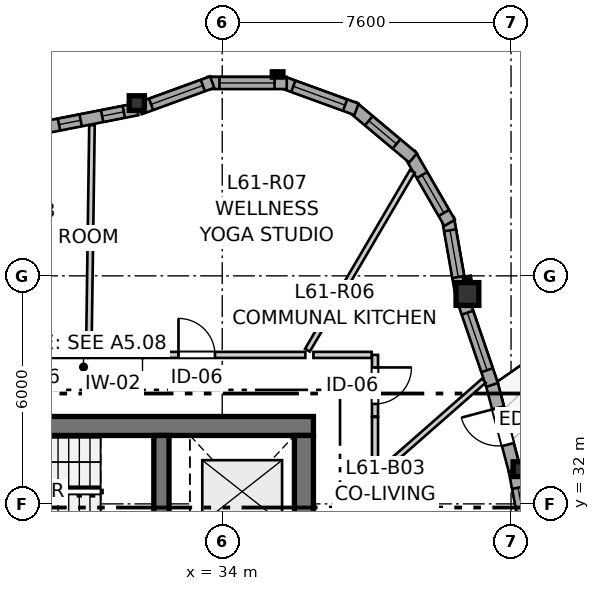
"""IFC4 building model, lengths in metres.
Left out: names, types, materials, properties, quantities, classifications, styles, units other than length and angle.
Written with IfcOpenShell. Run it as: python <this file> out.ifc"""

import sys

from ifc_helpers import new_model, si_unit, direction, frame, frame_2d, origin, origin_2d, place, context, subcontext, project, spatial, rectangle, i_section, extrude, source, transform, mapped, element, fill, save


model = new_model("IFC4")
c1 = context("Model", 3, precision=1e-05, world=origin(), true_north=direction((0.0, 1.0)))
c2 = subcontext(c1, "Body", "Model", "MODEL_VIEW")
j1 = project(units=[si_unit("LENGTHUNIT", "METRE"), si_unit("PLANEANGLEUNIT", "RADIAN")], contexts=[c1])
p1 = place(None, origin())
s1 = spatial("IfcSite", under=j1, at=p1, CompositionType="ELEMENT")
p2 = place(p1, origin())
s2 = spatial("IfcBuilding", under=s1, at=p2, CompositionType="ELEMENT")
p3 = place(p2, frame((0.0, 0.0, 205.2)))
s3 = spatial("IfcBuildingStorey", under=s2, at=p3, CompositionType="ELEMENT", Elevation=205.2)
p4 = place(p3, frame((36.4, 34.05, 0.0), z_axis=(0.0, 0.0, 1.0), x_axis=(-1.0, 0.0, 0.0)))
e1 = element("IfcWall", 1, at=p4, inside=s3, PredefinedType="SHEAR", context=c2, shape_type="SweptSolid", body=[
    extrude(rectangle(XDim=12.1, YDim=0.5, at=frame_2d((6.05, 0.0))), origin(), (0.0, 0.0, 1.0), 2.935),
])
p5 = place(p3, frame((36.15, 18.2, 0.0), z_axis=(0.0, 0.0, 1.0), x_axis=(0.0, 1.0, 0.0)))
e2 = element("IfcWall", 2, at=p5, inside=s3, PredefinedType="SHEAR", context=c2, shape_type="SweptSolid", body=[
    extrude(rectangle(XDim=15.6, YDim=0.5, at=frame_2d((7.8, 0.0))), origin(), (0.0, 0.0, 1.0), 2.935),
])
p6 = place(p5, frame((4.25, 0.0, 0.0)))
e3 = element("IfcOpeningElement", 3, at=p6, cuts=e2, PredefinedType="OPENING", context=c2, shape_type="SweptSolid", body=[
    extrude(rectangle(XDim=1.1, YDim=2.15, at=frame_2d((0.55, 1.075))), frame((0.0, 0.26, 0.0), z_axis=(0.0, -1.0, 0.0), x_axis=(1.0, 0.0, 0.0)), (0.0, 0.0, 1.0), 0.52),
])
p7 = place(p5, frame((10.25, 0.0, 0.0)))
e4 = element("IfcOpeningElement", 4, at=p7, cuts=e2, PredefinedType="OPENING", context=c2, shape_type="SweptSolid", body=[
    extrude(rectangle(XDim=1.1, YDim=2.15, at=frame_2d((0.55, 1.075))), frame((0.0, 0.26, 0.0), z_axis=(0.0, -1.0, 0.0), x_axis=(1.0, 0.0, 0.0)), (0.0, 0.0, 1.0), 0.52),
])
p8 = place(p3, frame((32.4, 30.85, 0.0), z_axis=(0.0, 0.0, 1.0), x_axis=(0.0, 1.0, 0.0)))
e5 = element("IfcWall", 5, at=p8, inside=s3, PredefinedType="SHEAR", context=c2, shape_type="SweptSolid", body=[
    extrude(rectangle(XDim=2.95, YDim=0.4, at=frame_2d((1.475, 0.0))), origin(), (0.0, 0.0, 1.0), 2.935),
])
m1 = source(origin(), c2, "Body", "SweptSolid", [
    extrude(i_section(OverallWidth=0.398, OverallDepth=0.387, WebThickness=0.019, FlangeThickness=0.03, FilletRadius=0.015, at=origin_2d()), origin(), (0.0, 0.0, 1.0), 2.935),
])
p9 = place(p3, frame((41.854, 32.914, 0.0), z_axis=(0.0, 0.0, 1.0), x_axis=(1.0, 0.0, 0.0)))
e6 = element("IfcColumn", 6, at=p9, inside=s3, PredefinedType="PILASTER", context=c2, shape_type="MappedRepresentation", body=[
    mapped(m1, transform((0.0, 0.0, 0.0), x_axis=(1.0, 0.0, 0.0), y_axis=(0.0, 1.0, 0.0), z_axis=(0.0, 0.0, 1.0), scale=1.0)),
])
m2 = source(origin(), c2, "Body", "SweptSolid", [
    extrude(rectangle(XDim=0.6, YDim=0.6, at=origin_2d()), origin(), (0.0, 0.0, 1.0), 2.935),
])
p10 = place(p3, frame((40.452, 37.522, 0.0), z_axis=(0.0, 0.0, 1.0), x_axis=(1.0, 0.0, 0.0)))
e7 = element("IfcColumn", 7, at=p10, inside=s3, PredefinedType="COLUMN", context=c2, shape_type="MappedRepresentation", body=[
    mapped(m2, transform((0.0, 0.0, 0.0), x_axis=(1.0, 0.0, 0.0), y_axis=(0.0, 1.0, 0.0), z_axis=(0.0, 0.0, 1.0), scale=1.0)),
])
p11 = place(p3, frame((31.752, 42.545, 0.0), z_axis=(0.0, 0.0, 1.0), x_axis=(1.0, 0.0, 0.0)))
e8 = element("IfcColumn", 8, at=p11, inside=s3, PredefinedType="PILASTER", context=c2, shape_type="MappedRepresentation", body=[
    mapped(m1, transform((0.0, 0.0, 0.0), x_axis=(1.0, 0.0, 0.0), y_axis=(0.0, 1.0, 0.0), z_axis=(0.0, 0.0, 1.0), scale=1.0)),
])
p12 = place(p3, frame((42.141, 30.542, 0.0), z_axis=(0.0, 0.0, 1.0), x_axis=(-0.186632734065, 0.982429754525, 0.0)))
e9 = element("IfcWall", 9, at=p12, inside=s3, PredefinedType="SOLIDWALL", context=c2, shape_type="SweptSolid", body=[
    extrude(rectangle(XDim=2.364, YDim=0.32, at=frame_2d((1.182, 0.0))), origin(), (0.0, 0.0, 1.0), 2.555),
])
p13 = place(p12, frame((0.467, 0.0, 0.82)))
e10 = element("IfcOpeningElement", 10, at=p13, cuts=e9, PredefinedType="OPENING", context=c2, shape_type="SweptSolid", body=[
    extrude(rectangle(XDim=1.45, YDim=1.25, at=frame_2d((0.725, 0.625))), frame((0.0, 0.17, 0.0), z_axis=(0.0, -1.0, 0.0), x_axis=(1.0, 0.0, 0.0)), (0.0, 0.0, 1.0), 0.34),
])
p14 = place(p3, frame((41.694, 32.892, 0.0), z_axis=(0.0, 0.0, 1.0), x_axis=(-0.257068132003, 0.966393282007, 0.0)))
e11 = element("IfcWall", 11, at=p14, inside=s3, PredefinedType="SOLIDWALL", context=c2, shape_type="SweptSolid", body=[
    extrude(rectangle(XDim=2.403, YDim=0.32, at=frame_2d((1.201, 0.0))), origin(), (0.0, 0.0, 1.0), 2.555),
])
p15 = place(p14, frame((0.691, 0.0, 0.0)))
e12 = element("IfcOpeningElement", 12, at=p15, cuts=e11, PredefinedType="OPENING", context=c2, shape_type="SweptSolid", body=[
    extrude(rectangle(XDim=1.0, YDim=2.1, at=frame_2d((0.5, 1.05))), frame((0.0, 0.17, 0.0), z_axis=(0.0, -1.0, 0.0), x_axis=(1.0, 0.0, 0.0)), (0.0, 0.0, 1.0), 0.34),
])
p16 = place(p3, frame((41.102, 35.13, 0.0), z_axis=(0.0, 0.0, 1.0), x_axis=(-0.323685265908, 0.946164810503, 0.0)))
e13 = element("IfcWall", 13, at=p16, inside=s3, PredefinedType="SOLIDWALL", context=c2, shape_type="SweptSolid", body=[
    extrude(rectangle(XDim=2.384, YDim=0.32, at=frame_2d((1.192, 0.0))), origin(), (0.0, 0.0, 1.0), 2.555),
])
p17 = place(p16, frame((0.408, 0.0, 0.82)))
e14 = element("IfcOpeningElement", 14, at=p17, cuts=e13, PredefinedType="OPENING", context=c2, shape_type="SweptSolid", body=[
    extrude(rectangle(XDim=1.6, YDim=1.35, at=frame_2d((0.8, 0.675))), frame((0.0, 0.17, 0.0), z_axis=(0.0, -1.0, 0.0), x_axis=(1.0, 0.0, 0.0)), (0.0, 0.0, 1.0), 0.34),
])
p18 = place(p3, frame((40.279, 37.583, 0.0), z_axis=(0.0, 0.0, 1.0), x_axis=(-0.173671780312, 0.984803590937, 0.0)))
e15 = element("IfcWall", 15, at=p18, inside=s3, PredefinedType="SOLIDWALL", context=c2, shape_type="SweptSolid", body=[
    extrude(rectangle(XDim=1.962, YDim=0.32, at=frame_2d((0.981, 0.0))), origin(), (0.0, 0.0, 1.0), 2.555),
])
p19 = place(p18, frame((0.391, 0.0, 0.82)))
e16 = element("IfcOpeningElement", 16, at=p19, cuts=e15, PredefinedType="OPENING", context=c2, shape_type="SweptSolid", body=[
    extrude(rectangle(XDim=1.25, YDim=1.35, at=frame_2d((0.625, 0.675))), frame((0.0, 0.17, 0.0), z_axis=(0.0, -1.0, 0.0), x_axis=(1.0, 0.0, 0.0)), (0.0, 0.0, 1.0), 0.34),
])
p20 = place(p3, frame((39.983, 39.393, 0.0), z_axis=(0.0, 0.0, 1.0), x_axis=(-0.499995423472, 0.866028046028, 0.0)))
e17 = element("IfcWall", 17, at=p20, inside=s3, PredefinedType="SOLIDWALL", context=c2, shape_type="SweptSolid", body=[
    extrude(rectangle(XDim=2.09, YDim=0.32, at=frame_2d((1.045, 0.0))), origin(), (0.0, 0.0, 1.0), 2.555),
])
p21 = place(p20, frame((0.303, 0.0, 0.82)))
e18 = element("IfcOpeningElement", 18, at=p21, cuts=e17, PredefinedType="OPENING", context=c2, shape_type="SweptSolid", body=[
    extrude(rectangle(XDim=1.15, YDim=1.2, at=frame_2d((0.575, 0.6))), frame((0.0, 0.17, 0.0), z_axis=(0.0, -1.0, 0.0), x_axis=(1.0, 0.0, 0.0)), (0.0, 0.0, 1.0), 0.34),
])
p22 = place(p3, frame((39.022, 41.104, 0.0), z_axis=(0.0, 0.0, 1.0), x_axis=(-0.766072824549, 0.642753784499, 0.0)))
e19 = element("IfcWall", 19, at=p22, inside=s3, PredefinedType="SOLIDWALL", context=c2, shape_type="SweptSolid", body=[
    extrude(rectangle(XDim=2.091, YDim=0.32, at=frame_2d((1.045, 0.0))), origin(), (0.0, 0.0, 1.0), 2.555),
])
p23 = place(p22, frame((0.57, 0.0, 0.82)))
e20 = element("IfcOpeningElement", 20, at=p23, cuts=e19, PredefinedType="OPENING", context=c2, shape_type="SweptSolid", body=[
    extrude(rectangle(XDim=0.95, YDim=1.35, at=frame_2d((0.475, 0.675))), frame((0.0, 0.17, 0.0), z_axis=(0.0, -1.0, 0.0), x_axis=(1.0, 0.0, 0.0)), (0.0, 0.0, 1.0), 0.34),
])
p24 = place(p3, frame((37.533, 42.382, 0.0), z_axis=(0.0, 0.0, 1.0), x_axis=(-0.939697896412, 0.342005648315, 0.0)))
e21 = element("IfcWall", 21, at=p24, inside=s3, PredefinedType="SOLIDWALL", context=c2, shape_type="SweptSolid", body=[
    extrude(rectangle(XDim=2.09, YDim=0.32, at=frame_2d((1.045, 0.0))), origin(), (0.0, 0.0, 1.0), 2.555),
])
p25 = place(p24, frame((0.32, 0.0, 0.82)))
e22 = element("IfcOpeningElement", 22, at=p25, cuts=e21, PredefinedType="OPENING", context=c2, shape_type="SweptSolid", body=[
    extrude(rectangle(XDim=1.45, YDim=1.25, at=frame_2d((0.725, 0.625))), frame((0.0, 0.17, 0.0), z_axis=(0.0, -1.0, 0.0), x_axis=(1.0, 0.0, 0.0)), (0.0, 0.0, 1.0), 0.34),
])
p26 = place(p3, frame((35.698, 43.074, 0.0), z_axis=(0.0, 0.0, 1.0), x_axis=(-1.0, 0.0, 0.0)))
e23 = element("IfcWall", 23, at=p26, inside=s3, PredefinedType="SOLIDWALL", context=c2, shape_type="SweptSolid", body=[
    extrude(rectangle(XDim=2.09, YDim=0.32, at=frame_2d((1.045, 0.0))), origin(), (0.0, 0.0, 1.0), 2.555),
])
p27 = place(p26, frame((0.32, 0.0, 0.82)))
e24 = element("IfcOpeningElement", 24, at=p27, cuts=e23, PredefinedType="OPENING", context=c2, shape_type="SweptSolid", body=[
    extrude(rectangle(XDim=1.45, YDim=1.25, at=frame_2d((0.725, 0.625))), frame((0.0, 0.17, 0.0), z_axis=(0.0, -1.0, 0.0), x_axis=(1.0, 0.0, 0.0)), (0.0, 0.0, 1.0), 0.34),
])
p28 = place(p3, frame((33.736, 43.097, 0.0), z_axis=(0.0, 0.0, 1.0), x_axis=(-0.939691662178, -0.342022777067, 0.0)))
e25 = element("IfcWall", 25, at=p28, inside=s3, PredefinedType="SOLIDWALL", context=c2, shape_type="SweptSolid", body=[
    extrude(rectangle(XDim=2.032, YDim=0.32, at=frame_2d((1.016, 0.0))), origin(), (0.0, 0.0, 1.0), 2.555),
])
p29 = place(p28, frame((0.261, 0.0, 0.82)))
e26 = element("IfcOpeningElement", 26, at=p29, cuts=e25, PredefinedType="OPENING", context=c2, shape_type="SweptSolid", body=[
    extrude(rectangle(XDim=1.45, YDim=1.25, at=frame_2d((0.725, 0.625))), frame((0.0, 0.17, 0.0), z_axis=(0.0, -1.0, 0.0), x_axis=(1.0, 0.0, 0.0)), (0.0, 0.0, 1.0), 0.34),
])
p30 = place(p3, frame((31.764, 42.385, 0.0), z_axis=(0.0, 0.0, 1.0), x_axis=(-0.981229659911, -0.192842823335, 0.0)))
e27 = element("IfcWall", 27, at=p30, inside=s3, PredefinedType="SOLIDWALL", context=c2, shape_type="SweptSolid", body=[
    extrude(rectangle(XDim=2.454, YDim=0.32, at=frame_2d((1.227, 0.0))), origin(), (0.0, 0.0, 1.0), 2.555),
])
p31 = place(p30, frame((0.361, 0.0, 0.82)))
e28 = element("IfcOpeningElement", 28, at=p31, cuts=e27, PredefinedType="OPENING", context=c2, shape_type="SweptSolid", body=[
    extrude(rectangle(XDim=0.58, YDim=1.35, at=frame_2d((0.29, 0.675))), frame((0.0, 0.17, 0.0), z_axis=(0.0, -1.0, 0.0), x_axis=(1.0, 0.0, 0.0)), (0.0, 0.0, 1.0), 0.34),
])
p32 = place(p30, frame((1.518, 0.0, 0.82)))
e29 = element("IfcOpeningElement", 29, at=p32, cuts=e27, PredefinedType="OPENING", context=c2, shape_type="SweptSolid", body=[
    extrude(rectangle(XDim=0.58, YDim=1.35, at=frame_2d((0.29, 0.675))), frame((0.0, 0.17, 0.0), z_axis=(0.0, -1.0, 0.0), x_axis=(1.0, 0.0, 0.0)), (0.0, 0.0, 1.0), 0.34),
])
p33 = place(p3, frame((30.474, 35.92, 0.0), z_axis=(0.0, 0.0, 1.0), x_axis=(1.0, 0.0, 0.0)))
e30 = element("IfcWall", 30, at=p33, inside=s3, PredefinedType="PARTITIONING", context=c2, shape_type="SweptSolid", body=[
    extrude(rectangle(XDim=5.713, YDim=0.16, at=frame_2d((2.856, 0.0))), origin(), (0.0, 0.0, 1.0), 2.935),
])
p34 = place(p33, frame((2.375, 0.0, 0.0)))
e31 = element("IfcOpeningElement", 31, at=p34, cuts=e30, PredefinedType="OPENING", context=c2, shape_type="SweptSolid", body=[
    extrude(rectangle(XDim=0.96, YDim=2.1, at=frame_2d((0.48, 1.05))), frame((0.0, 0.09, 0.0), z_axis=(0.0, -1.0, 0.0), x_axis=(1.0, 0.0, 0.0)), (0.0, 0.0, 1.0), 0.18),
])
p35 = place(p3, frame((38.02, 32.748, 0.0), z_axis=(0.0, 0.0, 1.0), x_axis=(0.0, -1.0, 0.0)))
e32 = element("IfcWall", 32, at=p35, inside=s3, PredefinedType="PARTITIONING", context=c2, shape_type="SweptSolid", body=[
    extrude(rectangle(XDim=4.71, YDim=0.16, at=frame_2d((2.355, 0.0))), origin(), (0.0, 0.0, 1.0), 2.603),
])
p36 = place(p35, frame((1.897, 0.0, 0.0)))
e33 = element("IfcOpeningElement", 33, at=p36, cuts=e32, PredefinedType="OPENING", context=c2, shape_type="SweptSolid", body=[
    extrude(rectangle(XDim=0.92, YDim=2.1, at=frame_2d((0.46, 1.05))), frame((0.0, 0.09, 0.0), z_axis=(0.0, -1.0, 0.0), x_axis=(1.0, 0.0, 0.0)), (0.0, 0.0, 1.0), 0.18),
])
p37 = place(p3, frame((27.598, 35.92, 0.0), z_axis=(0.0, 0.0, 1.0), x_axis=(1.0, 0.0, 0.0)))
e34 = element("IfcWall", 34, at=p37, inside=s3, PredefinedType="PARTITIONING", context=c2, shape_type="SweptSolid", body=[
    extrude(rectangle(XDim=2.861, YDim=0.16, at=frame_2d((1.431, 0.0))), origin(), (0.0, 0.0, 1.0), 2.935),
])
p38 = place(p37, frame((0.95, 0.0, 0.0)))
e35 = element("IfcOpeningElement", 35, at=p38, cuts=e34, PredefinedType="OPENING", context=c2, shape_type="SweptSolid", body=[
    extrude(rectangle(XDim=0.96, YDim=2.1, at=frame_2d((0.48, 1.05))), frame((0.0, 0.09, 0.0), z_axis=(0.0, -1.0, 0.0), x_axis=(1.0, 0.0, 0.0)), (0.0, 0.0, 1.0), 0.18),
])
p39 = place(p3, frame((38.02, 35.92, 0.0), z_axis=(0.0, 0.0, 1.0), x_axis=(0.0, -1.0, 0.0)))
e36 = element("IfcWall", 36, at=p39, inside=s3, PredefinedType="PARTITIONING", context=c2, shape_type="SweptSolid", body=[
    extrude(rectangle(XDim=1.62, YDim=0.16, at=frame_2d((0.81, 0.0))), origin(), (0.0, 0.0, 1.0), 2.603),
])
p40 = place(p39, frame((0.33, 0.0, 0.0)))
e37 = element("IfcOpeningElement", 37, at=p40, cuts=e36, PredefinedType="OPENING", context=c2, shape_type="SweptSolid", body=[
    extrude(rectangle(XDim=0.96, YDim=2.1, at=frame_2d((0.48, 1.05))), frame((0.0, 0.09, 0.0), z_axis=(0.0, -1.0, 0.0), x_axis=(1.0, 0.0, 0.0)), (0.0, 0.0, 1.0), 0.18),
])
p41 = place(p3, frame((30.489, 36.009, 0.0), z_axis=(0.0, 0.0, 1.0), x_axis=(0.013978627514, 0.999902294213, 0.0)))
e38 = element("IfcWall", 38, at=p41, inside=s3, PredefinedType="PARTITIONING", context=c2, shape_type="SweptSolid", body=[
    extrude(rectangle(XDim=5.956, YDim=0.145, at=frame_2d((2.978, 0.0))), origin(), (0.0, 0.0, 1.0), 2.935),
])
p42 = place(p3, frame((36.242, 36.044, 0.0), z_axis=(0.0, 0.0, 1.0), x_axis=(0.50599508157, 0.862536362959, 0.0)))
e39 = element("IfcWall", 39, at=p42, inside=s3, PredefinedType="PARTITIONING", context=c2, shape_type="SweptSolid", body=[
    extrude(rectangle(XDim=5.456, YDim=0.145, at=frame_2d((2.728, 0.0))), origin(), (0.0, 0.0, 1.0), 2.935),
])
p43 = place(p3, frame((38.154, 32.845, 0.0), z_axis=(0.0, 0.0, 1.0), x_axis=(0.751793032372, 0.659399148071, 0.0)))
e40 = element("IfcWall", 40, at=p43, inside=s3, PredefinedType="PARTITIONING", context=c2, shape_type="SweptSolid", body=[
    extrude(rectangle(XDim=3.631, YDim=0.145, at=frame_2d((1.815, 0.0))), origin(), (0.0, 0.0, 1.0), 2.935),
])
p44 = place(p3, frame((36.4, 35.92, 0.0), z_axis=(0.0, 0.0, 1.0), x_axis=(1.0, 0.0, 0.0)))
e41 = element("IfcWall", 41, at=p44, inside=s3, PredefinedType="PARTITIONING", context=c2, shape_type="SweptSolid", body=[
    extrude(rectangle(XDim=1.532, YDim=0.16, at=frame_2d((0.766, 0.0))), origin(), (0.0, 0.0, 1.0), 2.935),
])
p45 = place(p3, frame((38.02, 32.938, 0.0), z_axis=(0.0, 0.0, 1.0), x_axis=(0.0, 1.0, 0.0)))
e42 = element("IfcWall", 42, at=p45, inside=s3, PredefinedType="PARTITIONING", context=c2, shape_type="SweptSolid", body=[
    extrude(rectangle(XDim=1.347, YDim=0.16, at=frame_2d((0.674, 0.0))), origin(), (0.0, 0.0, 1.0), 2.603),
])
m3 = source(origin(), c2, "Body", "SweptSolid", [
    extrude(rectangle(XDim=1.45, YDim=1.25, at=frame_2d((0.725, 0.625))), frame((0.0, 0.03, 0.0), z_axis=(0.0, -1.0, 0.0), x_axis=(1.0, 0.0, 0.0)), (0.0, 0.0, 1.0), 0.06),
])
p46 = place(p13, origin())
e43 = element("IfcWindow", 43, at=p46, inside=s3, PartitioningType="SINGLE_PANEL", PredefinedType="WINDOW", context=c2, shape_type="MappedRepresentation", body=[
    mapped(m3, transform((0.0, 0.0, 0.0), x_axis=(1.0, 0.0, 0.0), y_axis=(0.0, 1.0, 0.0), z_axis=(0.0, 0.0, 1.0), scale=1.0)),
])
fill(e10, e43)
m4 = source(origin(), c2, "Body", "SweptSolid", [
    extrude(rectangle(XDim=1.0, YDim=2.1, at=frame_2d((0.5, 1.05))), frame((0.0, 0.025, 0.0), z_axis=(0.0, -1.0, 0.0), x_axis=(1.0, 0.0, 0.0)), (0.0, 0.0, 1.0), 0.05),
])
p47 = place(p15, origin())
e44 = element("IfcDoor", 44, at=p47, inside=s3, OperationType="SINGLE_SWING_RIGHT", PredefinedType="DOOR", context=c2, shape_type="MappedRepresentation", body=[
    mapped(m4, transform((0.0, 0.0, 0.0), x_axis=(1.0, 0.0, 0.0), y_axis=(0.0, 1.0, 0.0), z_axis=(0.0, 0.0, 1.0), scale=1.0)),
])
fill(e12, e44)
m5 = source(origin(), c2, "Body", "SweptSolid", [
    extrude(rectangle(XDim=1.6, YDim=1.35, at=frame_2d((0.8, 0.675))), frame((0.0, 0.03, 0.0), z_axis=(0.0, -1.0, 0.0), x_axis=(1.0, 0.0, 0.0)), (0.0, 0.0, 1.0), 0.06),
])
p48 = place(p17, origin())
e45 = element("IfcWindow", 45, at=p48, inside=s3, PartitioningType="SINGLE_PANEL", PredefinedType="WINDOW", context=c2, shape_type="MappedRepresentation", body=[
    mapped(m5, transform((0.0, 0.0, 0.0), x_axis=(1.0, 0.0, 0.0), y_axis=(0.0, 1.0, 0.0), z_axis=(0.0, 0.0, 1.0), scale=1.0)),
])
fill(e14, e45)
m6 = source(origin(), c2, "Body", "SweptSolid", [
    extrude(rectangle(XDim=1.25, YDim=1.35, at=frame_2d((0.625, 0.675))), frame((0.0, 0.03, 0.0), z_axis=(0.0, -1.0, 0.0), x_axis=(1.0, 0.0, 0.0)), (0.0, 0.0, 1.0), 0.06),
])
p49 = place(p19, origin())
e46 = element("IfcWindow", 46, at=p49, inside=s3, PartitioningType="SINGLE_PANEL", PredefinedType="WINDOW", context=c2, shape_type="MappedRepresentation", body=[
    mapped(m6, transform((0.0, 0.0, 0.0), x_axis=(1.0, 0.0, 0.0), y_axis=(0.0, 1.0, 0.0), z_axis=(0.0, 0.0, 1.0), scale=1.0)),
])
fill(e16, e46)
m7 = source(origin(), c2, "Body", "SweptSolid", [
    extrude(rectangle(XDim=1.15, YDim=1.2, at=frame_2d((0.575, 0.6))), frame((0.0, 0.03, 0.0), z_axis=(0.0, -1.0, 0.0), x_axis=(1.0, 0.0, 0.0)), (0.0, 0.0, 1.0), 0.06),
])
p50 = place(p21, origin())
e47 = element("IfcWindow", 47, at=p50, inside=s3, PartitioningType="SINGLE_PANEL", PredefinedType="WINDOW", context=c2, shape_type="MappedRepresentation", body=[
    mapped(m7, transform((0.0, 0.0, 0.0), x_axis=(1.0, 0.0, 0.0), y_axis=(0.0, 1.0, 0.0), z_axis=(0.0, 0.0, 1.0), scale=1.0)),
])
fill(e18, e47)
m8 = source(origin(), c2, "Body", "SweptSolid", [
    extrude(rectangle(XDim=0.95, YDim=1.35, at=frame_2d((0.475, 0.675))), frame((0.0, 0.03, 0.0), z_axis=(0.0, -1.0, 0.0), x_axis=(1.0, 0.0, 0.0)), (0.0, 0.0, 1.0), 0.06),
])
p51 = place(p23, origin())
e48 = element("IfcWindow", 48, at=p51, inside=s3, PartitioningType="SINGLE_PANEL", PredefinedType="WINDOW", context=c2, shape_type="MappedRepresentation", body=[
    mapped(m8, transform((0.0, 0.0, 0.0), x_axis=(1.0, 0.0, 0.0), y_axis=(0.0, 1.0, 0.0), z_axis=(0.0, 0.0, 1.0), scale=1.0)),
])
fill(e20, e48)
p52 = place(p25, origin())
e49 = element("IfcWindow", 49, at=p52, inside=s3, PartitioningType="SINGLE_PANEL", PredefinedType="WINDOW", context=c2, shape_type="MappedRepresentation", body=[
    mapped(m3, transform((0.0, 0.0, 0.0), x_axis=(1.0, 0.0, 0.0), y_axis=(0.0, 1.0, 0.0), z_axis=(0.0, 0.0, 1.0), scale=1.0)),
])
fill(e22, e49)
p53 = place(p27, origin())
e50 = element("IfcWindow", 50, at=p53, inside=s3, PartitioningType="SINGLE_PANEL", PredefinedType="WINDOW", context=c2, shape_type="MappedRepresentation", body=[
    mapped(m3, transform((0.0, 0.0, 0.0), x_axis=(1.0, 0.0, 0.0), y_axis=(0.0, 1.0, 0.0), z_axis=(0.0, 0.0, 1.0), scale=1.0)),
])
fill(e24, e50)
p54 = place(p29, origin())
e51 = element("IfcWindow", 51, at=p54, inside=s3, PartitioningType="SINGLE_PANEL", PredefinedType="WINDOW", context=c2, shape_type="MappedRepresentation", body=[
    mapped(m3, transform((0.0, 0.0, 0.0), x_axis=(1.0, 0.0, 0.0), y_axis=(0.0, 1.0, 0.0), z_axis=(0.0, 0.0, 1.0), scale=1.0)),
])
fill(e26, e51)
m9 = source(origin(), c2, "Body", "SweptSolid", [
    extrude(rectangle(XDim=0.58, YDim=1.35, at=frame_2d((0.29, 0.675))), frame((0.0, 0.03, 0.0), z_axis=(0.0, -1.0, 0.0), x_axis=(1.0, 0.0, 0.0)), (0.0, 0.0, 1.0), 0.06),
])
p55 = place(p31, origin())
e52 = element("IfcWindow", 52, at=p55, inside=s3, PartitioningType="SINGLE_PANEL", PredefinedType="WINDOW", context=c2, shape_type="MappedRepresentation", body=[
    mapped(m9, transform((0.0, 0.0, 0.0), x_axis=(1.0, 0.0, 0.0), y_axis=(0.0, 1.0, 0.0), z_axis=(0.0, 0.0, 1.0), scale=1.0)),
])
fill(e28, e52)
p56 = place(p32, origin())
e53 = element("IfcWindow", 53, at=p56, inside=s3, PartitioningType="SINGLE_PANEL", PredefinedType="WINDOW", context=c2, shape_type="MappedRepresentation", body=[
    mapped(m9, transform((0.0, 0.0, 0.0), x_axis=(1.0, 0.0, 0.0), y_axis=(0.0, 1.0, 0.0), z_axis=(0.0, 0.0, 1.0), scale=1.0)),
])
fill(e29, e53)
m10 = source(origin(), c2, "Body", "SweptSolid", [
    extrude(rectangle(XDim=0.96, YDim=2.1, at=frame_2d((0.48, 1.05))), frame((0.0, 0.025, 0.0), z_axis=(0.0, -1.0, 0.0), x_axis=(1.0, 0.0, 0.0)), (0.0, 0.0, 1.0), 0.05),
])
p57 = place(p34, origin())
e54 = element("IfcDoor", 54, at=p57, inside=s3, OperationType="SINGLE_SWING_LEFT", PredefinedType="DOOR", context=c2, shape_type="MappedRepresentation", body=[
    mapped(m10, transform((0.0, 0.0, 0.0), x_axis=(1.0, 0.0, 0.0), y_axis=(0.0, 1.0, 0.0), z_axis=(0.0, 0.0, 1.0), scale=1.0)),
])
fill(e31, e54)
p58 = place(p40, origin())
e55 = element("IfcDoor", 55, at=p58, inside=s3, OperationType="SINGLE_SWING_LEFT", PredefinedType="DOOR", context=c2, shape_type="MappedRepresentation", body=[
    mapped(m10, transform((0.0, 0.0, 0.0), x_axis=(1.0, 0.0, 0.0), y_axis=(0.0, 1.0, 0.0), z_axis=(0.0, 0.0, 1.0), scale=1.0)),
])
fill(e37, e55)
save(model, sys.argv[1])
